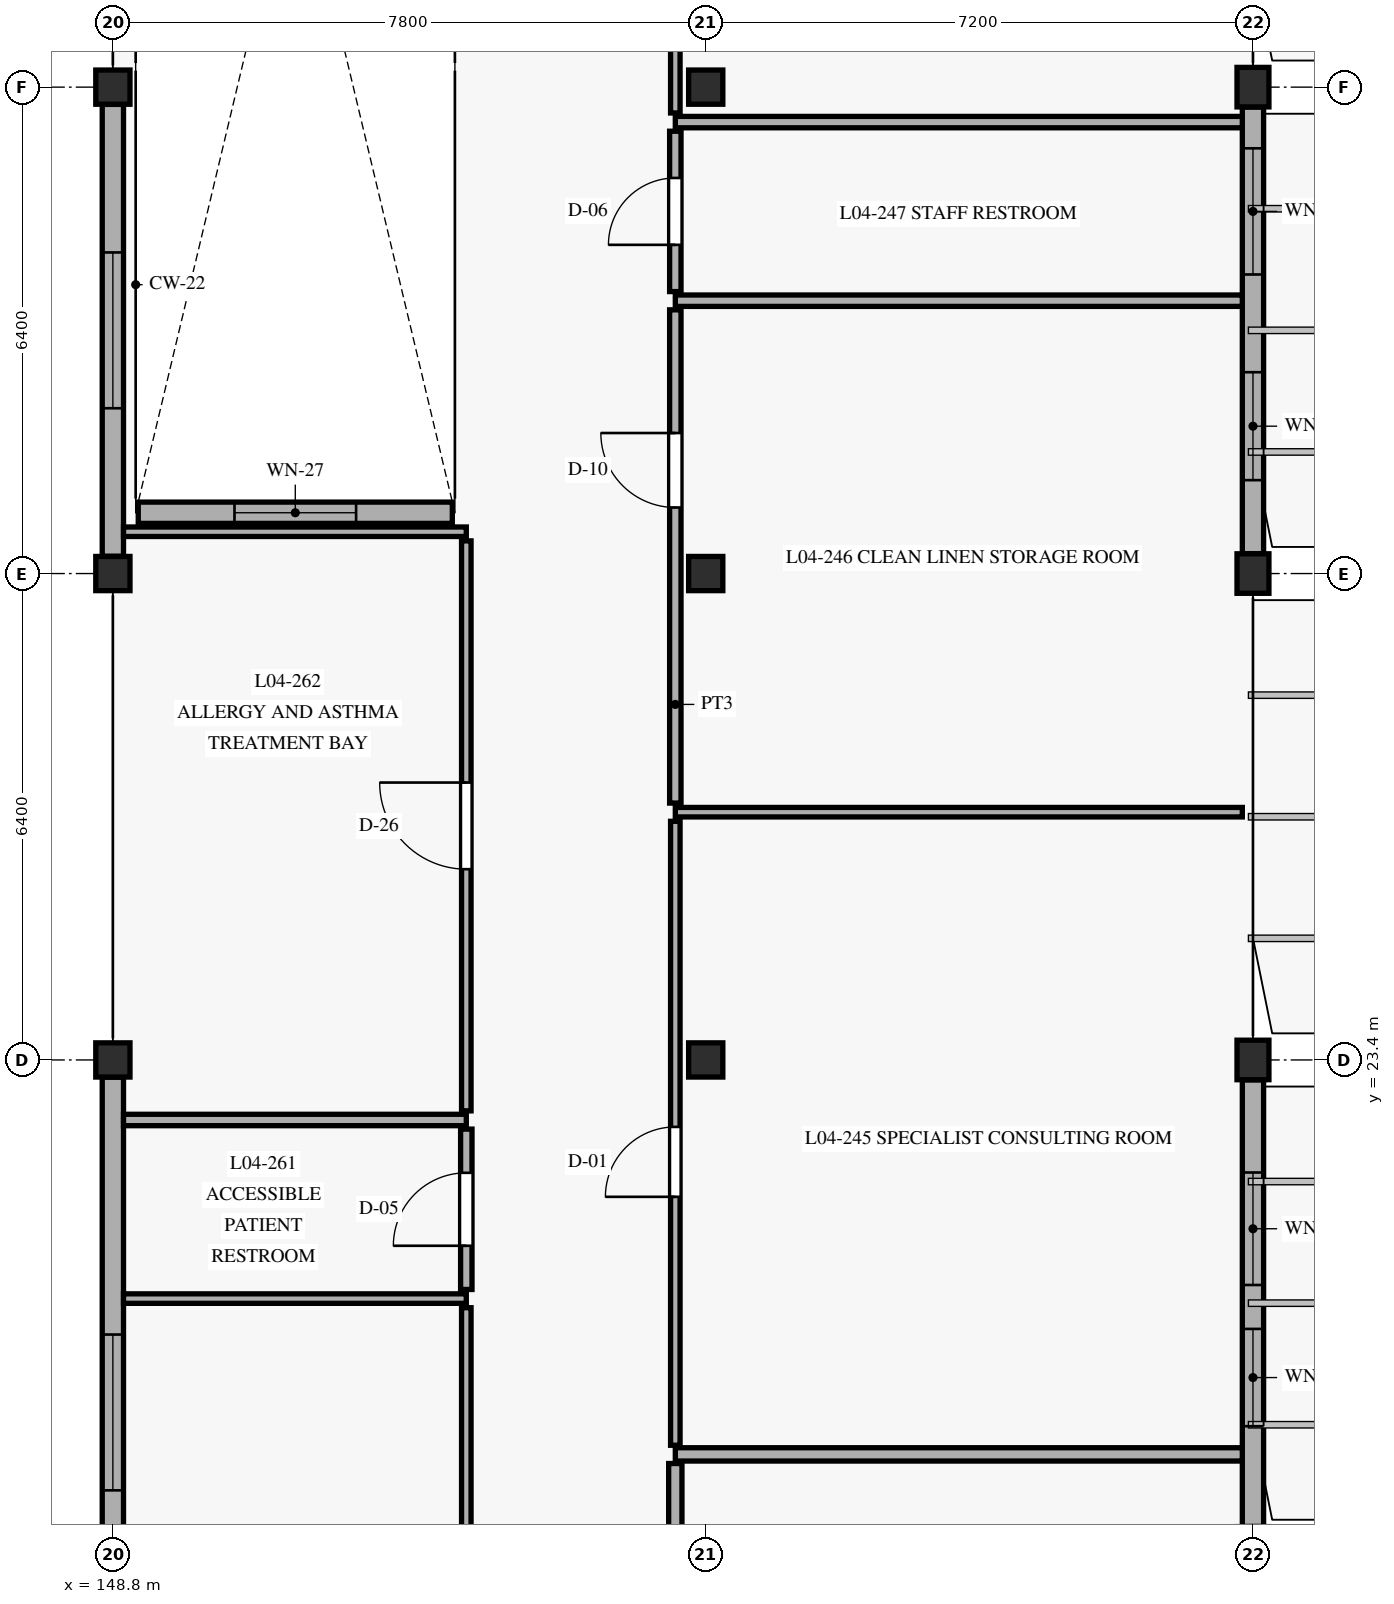
"""IFC4 building model, lengths in metres.
Left out: names, types, materials, properties, quantities, classifications, styles, units other than length and angle.
Written with IfcOpenShell. Run it as: python <this file> out.ifc"""

import sys

from ifc_helpers import new_model, si_unit, direction, frame, frame_2d, origin, origin_with_axes, origin_2d, place, context, subcontext, project, spatial, rectangle, extrude, element, fill, save


model = new_model("IFC4")
c1 = context("Model", 3, precision=1e-05, world=origin(), true_north=direction((0.0, 1.0)))
c2 = subcontext(c1, "Body", "Model", "MODEL_VIEW")
j1 = project(units=[si_unit("LENGTHUNIT", "METRE"), si_unit("PLANEANGLEUNIT", "RADIAN")], contexts=[c1])
p1 = place(None, origin())
s1 = spatial("IfcSite", under=j1, at=p1, CompositionType="ELEMENT")
p2 = place(p1, origin())
s2 = spatial("IfcBuilding", under=s1, at=p2, CompositionType="ELEMENT")
p3 = place(p2, frame((0.0, 0.0, 13.5)))
s3 = spatial("IfcBuildingStorey", under=s2, at=p3, CompositionType="ELEMENT", Elevation=13.5)
for number, where, z_axis, x_axis in (
    (1, (148.8, 23.4, 0.0), (0.0, 0.0, 1.0), (1.0, 0.0, 0.0)),
    (2, (148.8, 29.8, 0.0), (0.0, 0.0, 1.0), (1.0, 0.0, 0.0)),
    (3, (148.8, 36.2, 0.0), (0.0, 0.0, 1.0), (1.0, 0.0, 0.0)),
    (4, (156.6, 23.4, 0.0), (0.0, 0.0, 1.0), (1.0, 0.0, 0.0)),
    (5, (156.6, 29.8, 0.0), (0.0, 0.0, 1.0), (1.0, 0.0, 0.0)),
    (6, (156.6, 36.2, 0.0), (0.0, 0.0, 1.0), (1.0, 0.0, 0.0)),
):
    element("IfcColumn", number, at=place(p3, frame(where, z_axis=z_axis, x_axis=x_axis)), inside=s3, PredefinedType="COLUMN", context=c2, shape_type="SweptSolid", body=[
        extrude(rectangle(XDim=0.45, YDim=0.45, at=origin_2d()), origin(), (0.0, 0.0, 1.0), 4.05),
    ])
for number, where, z_axis, x_axis in (
    (7, (163.8, 23.4, 0.0), (0.0, 0.0, 1.0), (1.0, 0.0, 0.0)),
    (8, (163.8, 29.8, 0.0), (0.0, 0.0, 1.0), (1.0, 0.0, 0.0)),
    (9, (163.8, 36.2, 0.0), (0.0, 0.0, 1.0), (1.0, 0.0, 0.0)),
):
    element("IfcColumn", number, at=place(p3, frame(where, z_axis=z_axis, x_axis=x_axis)), inside=s3, PredefinedType="COLUMN", context=c2, shape_type="SweptSolid", body=[
        extrude(rectangle(XDim=0.42, YDim=0.52, at=origin_2d()), origin(), (0.0, 0.0, 1.0), 4.05),
    ])
p4 = place(p3, frame((163.8, 17.262, 0.0), z_axis=(0.0, 0.0, 1.0), x_axis=(0.0, 1.0, 0.0)))
e10 = element("IfcWall", 10, at=p4, inside=s3, PredefinedType="SOLIDWALL", context=c2, shape_type="SweptSolid", body=[
    extrude(rectangle(XDim=5.876, YDim=0.28, at=frame_2d((2.938, 0.0))), origin(), (0.0, 0.0, 1.0), 3.42),
])
p5 = place(p4, frame((1.319, 0.0, 0.88)))
e11 = element("IfcOpeningElement", 11, at=p5, cuts=e10, PredefinedType="OPENING", context=c2, shape_type="SweptSolid", body=[
    extrude(rectangle(XDim=1.28, YDim=1.95, at=frame_2d((0.64, 0.975))), frame((0.0, 0.15, 0.0), z_axis=(0.0, -1.0, 0.0), x_axis=(1.0, 0.0, 0.0)), (0.0, 0.0, 1.0), 0.3),
])
p6 = place(p4, frame((3.177, 0.0, 0.88)))
e12 = element("IfcOpeningElement", 12, at=p6, cuts=e10, PredefinedType="OPENING", context=c2, shape_type="SweptSolid", body=[
    extrude(rectangle(XDim=1.48, YDim=2.15, at=frame_2d((0.74, 1.075))), frame((0.0, 0.15, 0.0), z_axis=(0.0, -1.0, 0.0), x_axis=(1.0, 0.0, 0.0)), (0.0, 0.0, 1.0), 0.3),
])
p7 = place(p3, frame((163.8, 30.062, 0.0), z_axis=(0.0, 0.0, 1.0), x_axis=(0.0, 1.0, 0.0)))
e13 = element("IfcWall", 13, at=p7, inside=s3, PredefinedType="SOLIDWALL", context=c2, shape_type="SweptSolid", body=[
    extrude(rectangle(XDim=5.876, YDim=0.28, at=frame_2d((2.938, 0.0))), origin(), (0.0, 0.0, 1.0), 3.42),
])
p8 = place(p7, frame((0.967, 0.0, 0.88)))
e14 = element("IfcOpeningElement", 14, at=p8, cuts=e13, PredefinedType="OPENING", context=c2, shape_type="SweptSolid", body=[
    extrude(rectangle(XDim=1.42, YDim=1.9, at=frame_2d((0.71, 0.95))), frame((0.0, 0.15, 0.0), z_axis=(0.0, -1.0, 0.0), x_axis=(1.0, 0.0, 0.0)), (0.0, 0.0, 1.0), 0.3),
])
p9 = place(p7, frame((3.673, 0.0, 0.88)))
e15 = element("IfcOpeningElement", 15, at=p9, cuts=e13, PredefinedType="OPENING", context=c2, shape_type="SweptSolid", body=[
    extrude(rectangle(XDim=1.66, YDim=2.15, at=frame_2d((0.83, 1.075))), frame((0.0, 0.15, 0.0), z_axis=(0.0, -1.0, 0.0), x_axis=(1.0, 0.0, 0.0)), (0.0, 0.0, 1.0), 0.3),
])
p10 = place(p3, frame((148.8, 23.173, 0.0), z_axis=(0.0, 0.0, 1.0), x_axis=(0.0, -1.0, 0.0)))
e16 = element("IfcWall", 16, at=p10, inside=s3, PredefinedType="SOLIDWALL", context=c2, shape_type="SweptSolid", body=[
    extrude(rectangle(XDim=5.946, YDim=0.28, at=frame_2d((2.973, 0.0))), origin(), (0.0, 0.0, 1.0), 3.39),
])
p11 = place(p10, frame((3.386, 0.0, 0.8)))
e17 = element("IfcOpeningElement", 17, at=p11, cuts=e16, PredefinedType="OPENING", context=c2, shape_type="SweptSolid", body=[
    extrude(rectangle(XDim=2.05, YDim=1.95, at=frame_2d((1.025, 0.975))), frame((0.0, 0.15, 0.0), z_axis=(0.0, -1.0, 0.0), x_axis=(1.0, 0.0, 0.0)), (0.0, 0.0, 1.0), 0.3),
])
p12 = place(p3, frame((148.8, 35.973, 0.0), z_axis=(0.0, 0.0, 1.0), x_axis=(0.0, -1.0, 0.0)))
e18 = element("IfcWall", 18, at=p12, inside=s3, PredefinedType="SOLIDWALL", context=c2, shape_type="SweptSolid", body=[
    extrude(rectangle(XDim=5.946, YDim=0.28, at=frame_2d((2.973, 0.0))), origin(), (0.0, 0.0, 1.0), 3.39),
])
p13 = place(p12, frame((1.948, 0.0, 0.8)))
e19 = element("IfcOpeningElement", 19, at=p13, cuts=e18, PredefinedType="OPENING", context=c2, shape_type="SweptSolid", body=[
    extrude(rectangle(XDim=2.05, YDim=1.95, at=frame_2d((1.025, 0.975))), frame((0.0, 0.15, 0.0), z_axis=(0.0, -1.0, 0.0), x_axis=(1.0, 0.0, 0.0)), (0.0, 0.0, 1.0), 0.3),
])
p14 = place(p3, frame((153.266, 30.6, 0.0), z_axis=(0.0, 0.0, 1.0), x_axis=(-1.0, 0.0, 0.0)))
e20 = element("IfcWall", 20, at=p14, inside=s3, PredefinedType="SOLIDWALL", context=c2, shape_type="SweptSolid", body=[
    extrude(rectangle(XDim=4.132, YDim=0.28, at=frame_2d((2.066, 0.0))), origin(), (0.0, 0.0, 1.0), 3.77),
])
p15 = place(p14, frame((1.266, 0.0, 0.85)))
e21 = element("IfcOpeningElement", 21, at=p15, cuts=e20, PredefinedType="OPENING", context=c2, shape_type="SweptSolid", body=[
    extrude(rectangle(XDim=1.6, YDim=1.8, at=frame_2d((0.8, 0.9))), frame((0.0, 0.15, 0.0), z_axis=(0.0, -1.0, 0.0), x_axis=(1.0, 0.0, 0.0)), (0.0, 0.0, 1.0), 0.3),
])
p16 = place(p3, frame((156.2, 10.67, 0.0), z_axis=(0.0, 0.0, 1.0), x_axis=(0.0, 1.0, 0.0)))
e22 = element("IfcWall", 22, at=p16, inside=s3, PredefinedType="PARTITIONING", context=c2, shape_type="SweptSolid", body=[
    extrude(rectangle(XDim=7.42, YDim=0.175, at=frame_2d((3.71, 0.0))), origin(), (0.0, 0.0, 1.0), 3.365),
])
p17 = place(p16, frame((3.18, 0.0, 0.0)))
e23 = element("IfcOpeningElement", 23, at=p17, cuts=e22, PredefinedType="OPENING", context=c2, shape_type="SweptSolid", body=[
    extrude(rectangle(XDim=1.06, YDim=2.2, at=frame_2d((0.53, 1.1))), frame((0.0, 0.098, 0.0), z_axis=(0.0, -1.0, 0.0), x_axis=(1.0, 0.0, 0.0)), (0.0, 0.0, 1.0), 0.195),
])
p18 = place(p3, frame((156.2, 18.21, 0.0), z_axis=(0.0, 0.0, 1.0), x_axis=(1.0, 0.0, 0.0)))
e24 = element("IfcWall", 24, at=p18, inside=s3, PredefinedType="PARTITIONING", context=c2, shape_type="SweptSolid", body=[
    extrude(rectangle(XDim=7.46, YDim=0.175, at=frame_2d((3.73, 0.0))), origin(), (0.0, 0.0, 1.0), 3.385),
])
p19 = place(p3, frame((156.2, 18.33, 0.0), z_axis=(0.0, 0.0, 1.0), x_axis=(0.0, 1.0, 0.0)))
e25 = element("IfcWall", 25, at=p19, inside=s3, PredefinedType="PARTITIONING", context=c2, shape_type="SweptSolid", body=[
    extrude(rectangle(XDim=8.21, YDim=0.125, at=frame_2d((4.105, 0.0))), origin(), (0.0, 0.0, 1.0), 3.365),
])
p20 = place(p19, frame((3.269, 0.0, 0.0)))
e26 = element("IfcOpeningElement", 26, at=p20, cuts=e25, PredefinedType="OPENING", context=c2, shape_type="SweptSolid", body=[
    extrude(rectangle(XDim=0.92, YDim=2.15, at=frame_2d((0.46, 1.075))), frame((0.0, 0.073, 0.0), z_axis=(0.0, -1.0, 0.0), x_axis=(1.0, 0.0, 0.0)), (0.0, 0.0, 1.0), 0.145),
])
p21 = place(p3, frame((156.2, 26.66, 0.0), z_axis=(0.0, 0.0, 1.0), x_axis=(1.0, 0.0, 0.0)))
e27 = element("IfcWall", 27, at=p21, inside=s3, PredefinedType="PARTITIONING", context=c2, shape_type="SweptSolid", body=[
    extrude(rectangle(XDim=7.46, YDim=0.125, at=frame_2d((3.73, 0.0))), origin(), (0.0, 0.0, 1.0), 3.385),
])
p22 = place(p3, frame((156.2, 26.78, 0.0), z_axis=(0.0, 0.0, 1.0), x_axis=(0.0, 1.0, 0.0)))
e28 = element("IfcWall", 28, at=p22, inside=s3, PredefinedType="PARTITIONING", context=c2, shape_type="SweptSolid", body=[
    extrude(rectangle(XDim=6.49, YDim=0.15, at=frame_2d((3.245, 0.0))), origin(), (0.0, 0.0, 1.0), 3.365),
])
p23 = place(p22, frame((3.889, 0.0, 0.0)))
e29 = element("IfcOpeningElement", 29, at=p23, cuts=e28, PredefinedType="OPENING", context=c2, shape_type="SweptSolid", body=[
    extrude(rectangle(XDim=0.98, YDim=2.12, at=frame_2d((0.49, 1.06))), frame((0.0, 0.085, 0.0), z_axis=(0.0, -1.0, 0.0), x_axis=(1.0, 0.0, 0.0)), (0.0, 0.0, 1.0), 0.17),
])
p24 = place(p3, frame((156.2, 33.39, 0.0), z_axis=(0.0, 0.0, 1.0), x_axis=(1.0, 0.0, 0.0)))
e30 = element("IfcWall", 30, at=p24, inside=s3, PredefinedType="PARTITIONING", context=c2, shape_type="SweptSolid", body=[
    extrude(rectangle(XDim=7.46, YDim=0.15, at=frame_2d((3.73, 0.0))), origin(), (0.0, 0.0, 1.0), 3.385),
])
p25 = place(p3, frame((156.2, 33.51, 0.0), z_axis=(0.0, 0.0, 1.0), x_axis=(0.0, 1.0, 0.0)))
e31 = element("IfcWall", 31, at=p25, inside=s3, PredefinedType="PARTITIONING", context=c2, shape_type="SweptSolid", body=[
    extrude(rectangle(XDim=2.11, YDim=0.15, at=frame_2d((1.055, 0.0))), origin(), (0.0, 0.0, 1.0), 3.765),
])
p26 = place(p25, frame((0.615, 0.0, 0.0)))
e32 = element("IfcOpeningElement", 32, at=p26, cuts=e31, PredefinedType="OPENING", context=c2, shape_type="SweptSolid", body=[
    extrude(rectangle(XDim=0.88, YDim=2.1, at=frame_2d((0.44, 1.05))), frame((0.0, 0.085, 0.0), z_axis=(0.0, -1.0, 0.0), x_axis=(1.0, 0.0, 0.0)), (0.0, 0.0, 1.0), 0.17),
])
p27 = place(p3, frame((156.2, 35.74, 0.0), z_axis=(0.0, 0.0, 1.0), x_axis=(1.0, 0.0, 0.0)))
e33 = element("IfcWall", 33, at=p27, inside=s3, PredefinedType="PARTITIONING", context=c2, shape_type="SweptSolid", body=[
    extrude(rectangle(XDim=7.46, YDim=0.15, at=frame_2d((3.73, 0.0))), origin(), (0.0, 0.0, 1.0), 3.385),
])
p28 = place(p3, frame((156.2, 35.86, 0.0), z_axis=(0.0, 0.0, 1.0), x_axis=(0.0, 1.0, 0.0)))
e34 = element("IfcWall", 34, at=p28, inside=s3, PredefinedType="PARTITIONING", context=c2, shape_type="SweptSolid", body=[
    extrude(rectangle(XDim=6.14, YDim=0.125, at=frame_2d((3.07, 0.0))), origin(), (0.0, 0.0, 1.0), 3.765),
])
p29 = place(p28, frame((2.51, 0.0, 0.0)))
e35 = element("IfcOpeningElement", 35, at=p29, cuts=e34, PredefinedType="OPENING", context=c2, shape_type="SweptSolid", body=[
    extrude(rectangle(XDim=1.12, YDim=2.2, at=frame_2d((0.56, 1.1))), frame((0.0, 0.073, 0.0), z_axis=(0.0, -1.0, 0.0), x_axis=(1.0, 0.0, 0.0)), (0.0, 0.0, 1.0), 0.145),
])
p30 = place(p3, frame((153.45, 11.56, 0.0), z_axis=(0.0, 0.0, 1.0), x_axis=(0.0, 1.0, 0.0)))
e36 = element("IfcWall", 36, at=p30, inside=s3, PredefinedType="PARTITIONING", context=c2, shape_type="SweptSolid", body=[
    extrude(rectangle(XDim=8.58, YDim=0.125, at=frame_2d((4.29, 0.0))), origin(), (0.0, 0.0, 1.0), 3.365),
])
p31 = place(p30, frame((3.756, 0.0, 0.0)))
e37 = element("IfcOpeningElement", 37, at=p31, cuts=e36, PredefinedType="OPENING", context=c2, shape_type="SweptSolid", body=[
    extrude(rectangle(XDim=1.22, YDim=2.2, at=frame_2d((0.61, 1.1))), frame((0.0, 0.073, 0.0), z_axis=(0.0, -1.0, 0.0), x_axis=(1.0, 0.0, 0.0)), (0.0, 0.0, 1.0), 0.145),
])
p32 = place(p3, frame((148.94, 20.26, 0.0), z_axis=(0.0, 0.0, 1.0), x_axis=(1.0, 0.0, 0.0)))
e38 = element("IfcWall", 38, at=p32, inside=s3, PredefinedType="PARTITIONING", context=c2, shape_type="SweptSolid", body=[
    extrude(rectangle(XDim=4.51, YDim=0.125, at=frame_2d((2.255, 0.0))), origin(), (0.0, 0.0, 1.0), 3.385),
])
p33 = place(p3, frame((153.45, 20.38, 0.0), z_axis=(0.0, 0.0, 1.0), x_axis=(0.0, 1.0, 0.0)))
e39 = element("IfcWall", 39, at=p33, inside=s3, PredefinedType="PARTITIONING", context=c2, shape_type="SweptSolid", body=[
    extrude(rectangle(XDim=2.11, YDim=0.15, at=frame_2d((1.055, 0.0))), origin(), (0.0, 0.0, 1.0), 3.765),
])
p34 = place(p33, frame((0.575, 0.0, 0.0)))
e40 = element("IfcOpeningElement", 40, at=p34, cuts=e39, PredefinedType="OPENING", context=c2, shape_type="SweptSolid", body=[
    extrude(rectangle(XDim=0.96, YDim=2.1, at=frame_2d((0.48, 1.05))), frame((0.0, 0.085, 0.0), z_axis=(0.0, -1.0, 0.0), x_axis=(1.0, 0.0, 0.0)), (0.0, 0.0, 1.0), 0.17),
])
p35 = place(p3, frame((148.94, 22.61, 0.0), z_axis=(0.0, 0.0, 1.0), x_axis=(1.0, 0.0, 0.0)))
e41 = element("IfcWall", 41, at=p35, inside=s3, PredefinedType="PARTITIONING", context=c2, shape_type="SweptSolid", body=[
    extrude(rectangle(XDim=4.51, YDim=0.15, at=frame_2d((2.255, 0.0))), origin(), (0.0, 0.0, 1.0), 3.385),
])
p36 = place(p3, frame((153.45, 22.73, 0.0), z_axis=(0.0, 0.0, 1.0), x_axis=(0.0, 1.0, 0.0)))
e42 = element("IfcWall", 42, at=p36, inside=s3, PredefinedType="PARTITIONING", context=c2, shape_type="SweptSolid", body=[
    extrude(rectangle(XDim=7.5, YDim=0.125, at=frame_2d((3.75, 0.0))), origin(), (0.0, 0.0, 1.0), 3.365),
])
p37 = place(p36, frame((3.18, 0.0, 0.0)))
e43 = element("IfcOpeningElement", 43, at=p37, cuts=e42, PredefinedType="OPENING", context=c2, shape_type="SweptSolid", body=[
    extrude(rectangle(XDim=1.14, YDim=2.22, at=frame_2d((0.57, 1.11))), frame((0.0, 0.073, 0.0), z_axis=(0.0, -1.0, 0.0), x_axis=(1.0, 0.0, 0.0)), (0.0, 0.0, 1.0), 0.145),
])
p38 = place(p3, frame((148.94, 30.35, 0.0), z_axis=(0.0, 0.0, 1.0), x_axis=(1.0, 0.0, 0.0)))
e44 = element("IfcWall", 44, at=p38, inside=s3, PredefinedType="PARTITIONING", context=c2, shape_type="SweptSolid", body=[
    extrude(rectangle(XDim=4.51, YDim=0.125, at=frame_2d((2.255, 0.0))), origin(), (0.0, 0.0, 1.0), 3.385),
])
p39 = place(p5, origin_with_axes())
e45 = element("IfcWindow", 45, at=p39, inside=s3, PartitioningType="SINGLE_PANEL", PredefinedType="WINDOW", context=c2, shape_type="SweptSolid", body=[
    extrude(rectangle(XDim=1.28, YDim=1.95, at=frame_2d((0.64, 0.975))), frame((0.0, 0.03, 0.0), z_axis=(0.0, -1.0, 0.0), x_axis=(1.0, 0.0, 0.0)), (0.0, 0.0, 1.0), 0.06),
])
fill(e11, e45)
p40 = place(p6, origin_with_axes())
e46 = element("IfcWindow", 46, at=p40, inside=s3, PartitioningType="SINGLE_PANEL", PredefinedType="WINDOW", context=c2, shape_type="SweptSolid", body=[
    extrude(rectangle(XDim=1.48, YDim=2.15, at=frame_2d((0.74, 1.075))), frame((0.0, 0.03, 0.0), z_axis=(0.0, -1.0, 0.0), x_axis=(1.0, 0.0, 0.0)), (0.0, 0.0, 1.0), 0.06),
])
fill(e12, e46)
p41 = place(p8, origin_with_axes())
e47 = element("IfcWindow", 47, at=p41, inside=s3, PartitioningType="SINGLE_PANEL", PredefinedType="WINDOW", context=c2, shape_type="SweptSolid", body=[
    extrude(rectangle(XDim=1.42, YDim=1.9, at=frame_2d((0.71, 0.95))), frame((0.0, 0.03, 0.0), z_axis=(0.0, -1.0, 0.0), x_axis=(1.0, 0.0, 0.0)), (0.0, 0.0, 1.0), 0.06),
])
fill(e14, e47)
p42 = place(p9, origin_with_axes())
e48 = element("IfcWindow", 48, at=p42, inside=s3, PartitioningType="SINGLE_PANEL", PredefinedType="WINDOW", context=c2, shape_type="SweptSolid", body=[
    extrude(rectangle(XDim=1.66, YDim=2.15, at=frame_2d((0.83, 1.075))), frame((0.0, 0.03, 0.0), z_axis=(0.0, -1.0, 0.0), x_axis=(1.0, 0.0, 0.0)), (0.0, 0.0, 1.0), 0.06),
])
fill(e15, e48)
p43 = place(p11, origin_with_axes())
e49 = element("IfcWindow", 49, at=p43, inside=s3, PartitioningType="SINGLE_PANEL", PredefinedType="WINDOW", context=c2, shape_type="SweptSolid", body=[
    extrude(rectangle(XDim=2.05, YDim=1.95, at=frame_2d((1.025, 0.975))), frame((0.0, 0.03, 0.0), z_axis=(0.0, -1.0, 0.0), x_axis=(1.0, 0.0, 0.0)), (0.0, 0.0, 1.0), 0.06),
])
fill(e17, e49)
p44 = place(p13, origin_with_axes())
e50 = element("IfcWindow", 50, at=p44, inside=s3, PartitioningType="SINGLE_PANEL", PredefinedType="WINDOW", context=c2, shape_type="SweptSolid", body=[
    extrude(rectangle(XDim=2.05, YDim=1.95, at=frame_2d((1.025, 0.975))), frame((0.0, 0.03, 0.0), z_axis=(0.0, -1.0, 0.0), x_axis=(1.0, 0.0, 0.0)), (0.0, 0.0, 1.0), 0.06),
])
fill(e19, e50)
p45 = place(p15, origin_with_axes())
e51 = element("IfcWindow", 51, at=p45, inside=s3, PartitioningType="SINGLE_PANEL", PredefinedType="WINDOW", context=c2, shape_type="SweptSolid", body=[
    extrude(rectangle(XDim=1.6, YDim=1.8, at=frame_2d((0.8, 0.9))), frame((0.0, 0.03, 0.0), z_axis=(0.0, -1.0, 0.0), x_axis=(1.0, 0.0, 0.0)), (0.0, 0.0, 1.0), 0.06),
])
fill(e21, e51)
p46 = place(p20, frame((0.92, 0.0, 0.0), z_axis=(0.0, 0.0, 1.0), x_axis=(-1.0, 0.0, 0.0)))
e52 = element("IfcDoor", 52, at=p46, inside=s3, OperationType="SINGLE_SWING_RIGHT", PredefinedType="DOOR", context=c2, shape_type="SweptSolid", body=[
    extrude(rectangle(XDim=0.92, YDim=2.15, at=frame_2d((0.46, 1.075))), frame((0.0, 0.025, 0.0), z_axis=(0.0, -1.0, 0.0), x_axis=(1.0, 0.0, 0.0)), (0.0, 0.0, 1.0), 0.05),
])
fill(e26, e52)
p47 = place(p23, frame((0.98, 0.0, 0.0), z_axis=(0.0, 0.0, 1.0), x_axis=(-1.0, 0.0, 0.0)))
e53 = element("IfcDoor", 53, at=p47, inside=s3, OperationType="SINGLE_SWING_LEFT", PredefinedType="DOOR", context=c2, shape_type="SweptSolid", body=[
    extrude(rectangle(XDim=0.98, YDim=2.12, at=frame_2d((0.49, 1.06))), frame((0.0, 0.025, 0.0), z_axis=(0.0, -1.0, 0.0), x_axis=(1.0, 0.0, 0.0)), (0.0, 0.0, 1.0), 0.05),
])
fill(e29, e53)
p48 = place(p26, frame((0.88, 0.0, 0.0), z_axis=(0.0, 0.0, 1.0), x_axis=(-1.0, 0.0, 0.0)))
e54 = element("IfcDoor", 54, at=p48, inside=s3, OperationType="SINGLE_SWING_RIGHT", PredefinedType="DOOR", context=c2, shape_type="SweptSolid", body=[
    extrude(rectangle(XDim=0.88, YDim=2.1, at=frame_2d((0.44, 1.05))), frame((0.0, 0.025, 0.0), z_axis=(0.0, -1.0, 0.0), x_axis=(1.0, 0.0, 0.0)), (0.0, 0.0, 1.0), 0.05),
])
fill(e32, e54)
p49 = place(p34, origin_with_axes())
e55 = element("IfcDoor", 55, at=p49, inside=s3, OperationType="SINGLE_SWING_LEFT", PredefinedType="DOOR", context=c2, shape_type="SweptSolid", body=[
    extrude(rectangle(XDim=0.96, YDim=2.1, at=frame_2d((0.48, 1.05))), frame((0.0, 0.025, 0.0), z_axis=(0.0, -1.0, 0.0), x_axis=(1.0, 0.0, 0.0)), (0.0, 0.0, 1.0), 0.05),
])
fill(e40, e55)
p50 = place(p37, origin_with_axes())
e56 = element("IfcDoor", 56, at=p50, inside=s3, OperationType="SINGLE_SWING_RIGHT", PredefinedType="DOOR", context=c2, shape_type="SweptSolid", body=[
    extrude(rectangle(XDim=1.14, YDim=2.22, at=frame_2d((0.57, 1.11))), frame((0.0, 0.025, 0.0), z_axis=(0.0, -1.0, 0.0), x_axis=(1.0, 0.0, 0.0)), (0.0, 0.0, 1.0), 0.05),
])
fill(e43, e56)
save(model, sys.argv[1])
